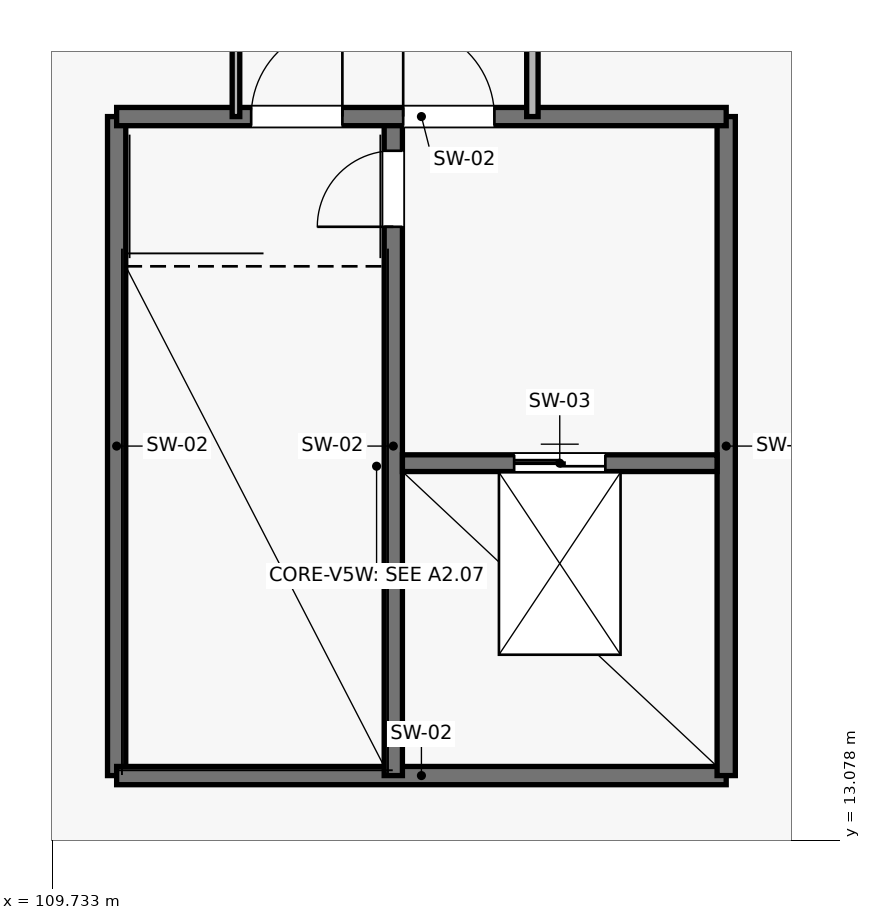
"""IFC4 building model, lengths in metres.
Left out: names, types, materials, properties, quantities, classifications, styles, units other than length and angle.
Written with IfcOpenShell. Run it as: python <this file> out.ifc"""

import sys

from ifc_helpers import new_model, si_unit, direction, frame, frame_2d, origin, place, context, subcontext, project, spatial, rectangle, extrude, element, fill, save


model = new_model("IFC4")
c1 = context("Model", 3, precision=1e-05, world=origin(), true_north=direction((0.0, 1.0)))
c2 = subcontext(c1, "Body", "Model", "MODEL_VIEW")
j1 = project(units=[si_unit("LENGTHUNIT", "METRE"), si_unit("PLANEANGLEUNIT", "RADIAN")], contexts=[c1])
p1 = place(None, origin())
s1 = spatial("IfcSite", under=j1, at=p1, CompositionType="ELEMENT")
p2 = place(p1, origin())
s2 = spatial("IfcBuilding", under=s1, at=p2, CompositionType="ELEMENT")
p3 = place(p2, frame((0.0, 0.0, 16.2)))
s3 = spatial("IfcBuildingStorey", under=s2, at=p3, CompositionType="ELEMENT", Elevation=16.2)
p4 = place(p3, frame((110.58, 22.6, 0.0), z_axis=(0.0, 0.0, 1.0), x_axis=(0.0, -1.0, 0.0)))
e1 = element("IfcWall", 1, at=p4, inside=s3, PredefinedType="SHEAR", context=c2, shape_type="SweptSolid", body=[
    extrude(rectangle(XDim=8.67, YDim=0.24, at=frame_2d((4.335, 0.0))), origin(), (0.0, 0.0, 1.0), 4.59),
])
p5 = place(p3, frame((110.58, 13.93, 0.0), z_axis=(0.0, 0.0, 1.0), x_axis=(1.0, 0.0, 0.0)))
e2 = element("IfcWall", 2, at=p5, inside=s3, PredefinedType="SHEAR", context=c2, shape_type="SweptSolid", body=[
    extrude(rectangle(XDim=8.02, YDim=0.24, at=frame_2d((4.01, 0.0))), origin(), (0.0, 0.0, 1.0), 4.59),
])
p6 = place(p3, frame((114.22, 13.93, 0.0), z_axis=(0.0, 0.0, 1.0), x_axis=(0.0, 1.0, 0.0)))
e3 = element("IfcWall", 3, at=p6, inside=s3, PredefinedType="SHEAR", context=c2, shape_type="SweptSolid", body=[
    extrude(rectangle(XDim=8.67, YDim=0.24, at=frame_2d((4.335, 0.0))), origin(), (0.0, 0.0, 1.0), 4.59),
])
p7 = place(p6, frame((7.22, 0.0, 0.0)))
e4 = element("IfcOpeningElement", 4, at=p7, cuts=e3, PredefinedType="OPENING", context=c2, shape_type="SweptSolid", body=[
    extrude(rectangle(XDim=1.0, YDim=2.2, at=frame_2d((0.5, 1.1))), frame((0.0, 0.135, 0.0), z_axis=(0.0, -1.0, 0.0), x_axis=(1.0, 0.0, 0.0)), (0.0, 0.0, 1.0), 0.27),
])
p8 = place(p3, frame((118.6, 13.93, 0.0), z_axis=(0.0, 0.0, 1.0), x_axis=(0.0, 1.0, 0.0)))
e5 = element("IfcWall", 5, at=p8, inside=s3, PredefinedType="SHEAR", context=c2, shape_type="SweptSolid", body=[
    extrude(rectangle(XDim=8.67, YDim=0.24, at=frame_2d((4.335, 0.0))), origin(), (0.0, 0.0, 1.0), 4.59),
])
p9 = place(p3, frame((110.58, 22.6, 0.0), z_axis=(0.0, 0.0, 1.0), x_axis=(1.0, 0.0, 0.0)))
e6 = element("IfcWall", 6, at=p9, inside=s3, PredefinedType="SHEAR", context=c2, shape_type="SweptSolid", body=[
    extrude(rectangle(XDim=8.02, YDim=0.24, at=frame_2d((4.01, 0.0))), origin(), (0.0, 0.0, 1.0), 4.59),
])
p10 = place(p9, frame((1.77, 0.0, 0.0)))
e7 = element("IfcOpeningElement", 7, at=p10, cuts=e6, PredefinedType="OPENING", context=c2, shape_type="SweptSolid", body=[
    extrude(rectangle(XDim=1.2, YDim=2.2, at=frame_2d((0.6, 1.1))), frame((0.0, 0.135, 0.0), z_axis=(0.0, -1.0, 0.0), x_axis=(1.0, 0.0, 0.0)), (0.0, 0.0, 1.0), 0.27),
])
p11 = place(p9, frame((3.77, 0.0, 0.0)))
e8 = element("IfcOpeningElement", 8, at=p11, cuts=e6, PredefinedType="OPENING", context=c2, shape_type="SweptSolid", body=[
    extrude(rectangle(XDim=1.2, YDim=2.2, at=frame_2d((0.6, 1.1))), frame((0.0, 0.135, 0.0), z_axis=(0.0, -1.0, 0.0), x_axis=(1.0, 0.0, 0.0)), (0.0, 0.0, 1.0), 0.27),
])
p12 = place(p3, frame((114.34, 18.04, 0.0), z_axis=(0.0, 0.0, 1.0), x_axis=(1.0, 0.0, 0.0)))
e9 = element("IfcWall", 9, at=p12, inside=s3, PredefinedType="SHEAR", context=c2, shape_type="SweptSolid", body=[
    extrude(rectangle(XDim=4.14, YDim=0.22, at=frame_2d((2.07, 0.0))), origin(), (0.0, 0.0, 1.0), 4.59),
])
p13 = place(p12, frame((1.47, 0.0, 0.0)))
e10 = element("IfcOpeningElement", 10, at=p13, cuts=e9, PredefinedType="OPENING", context=c2, shape_type="SweptSolid", body=[
    extrude(rectangle(XDim=1.2, YDim=2.2, at=frame_2d((0.6, 1.1))), frame((0.0, 0.125, 0.0), z_axis=(0.0, -1.0, 0.0), x_axis=(1.0, 0.0, 0.0)), (0.0, 0.0, 1.0), 0.25),
])
p14 = place(p3, frame((112.15, 22.6, 0.0), z_axis=(0.0, 0.0, 1.0), x_axis=(0.0, 1.0, 0.0)))
e11 = element("IfcWall", 11, at=p14, inside=s3, PredefinedType="PARTITIONING", context=c2, shape_type="SweptSolid", body=[
    extrude(rectangle(XDim=2.8, YDim=0.1, at=frame_2d((1.4, 0.0))), origin(), (0.0, 0.0, 1.0), 3.563),
])
p15 = place(p3, frame((116.05, 22.6, 0.0), z_axis=(0.0, 0.0, 1.0), x_axis=(0.0, 1.0, 0.0)))
e12 = element("IfcWall", 12, at=p15, inside=s3, PredefinedType="PARTITIONING", context=c2, shape_type="SweptSolid", body=[
    extrude(rectangle(XDim=2.8, YDim=0.15, at=frame_2d((1.4, 0.0))), origin(), (0.0, 0.0, 1.0), 3.563),
])
p16 = place(p10, origin())
e13 = element("IfcDoor", 13, at=p16, inside=s3, OperationType="SINGLE_SWING_RIGHT", PredefinedType="DOOR", context=c2, shape_type="SweptSolid", body=[
    extrude(rectangle(XDim=1.2, YDim=2.2, at=frame_2d((0.6, 1.1))), frame((0.0, 0.025, 0.0), z_axis=(0.0, -1.0, 0.0), x_axis=(1.0, 0.0, 0.0)), (0.0, 0.0, 1.0), 0.05),
])
fill(e7, e13)
p17 = place(p11, origin())
e14 = element("IfcDoor", 14, at=p17, inside=s3, OperationType="SINGLE_SWING_LEFT", PredefinedType="DOOR", context=c2, shape_type="SweptSolid", body=[
    extrude(rectangle(XDim=1.2, YDim=2.2, at=frame_2d((0.6, 1.1))), frame((0.0, 0.025, 0.0), z_axis=(0.0, -1.0, 0.0), x_axis=(1.0, 0.0, 0.0)), (0.0, 0.0, 1.0), 0.05),
])
fill(e8, e14)
p18 = place(p7, origin())
e15 = element("IfcDoor", 15, at=p18, inside=s3, OperationType="SINGLE_SWING_LEFT", PredefinedType="DOOR", context=c2, shape_type="SweptSolid", body=[
    extrude(rectangle(XDim=1.0, YDim=2.2, at=frame_2d((0.5, 1.1))), frame((0.0, 0.025, 0.0), z_axis=(0.0, -1.0, 0.0), x_axis=(1.0, 0.0, 0.0)), (0.0, 0.0, 1.0), 0.05),
])
fill(e4, e15)
p19 = place(p13, origin())
e16 = element("IfcDoor", 16, at=p19, inside=s3, OperationType="DOUBLE_DOOR_SLIDING", PredefinedType="DOOR", context=c2, shape_type="SweptSolid", body=[
    extrude(rectangle(XDim=1.2, YDim=2.2, at=frame_2d((0.6, 1.1))), frame((0.0, 0.025, 0.0), z_axis=(0.0, -1.0, 0.0), x_axis=(1.0, 0.0, 0.0)), (0.0, 0.0, 1.0), 0.05),
])
fill(e10, e16)
save(model, sys.argv[1])
